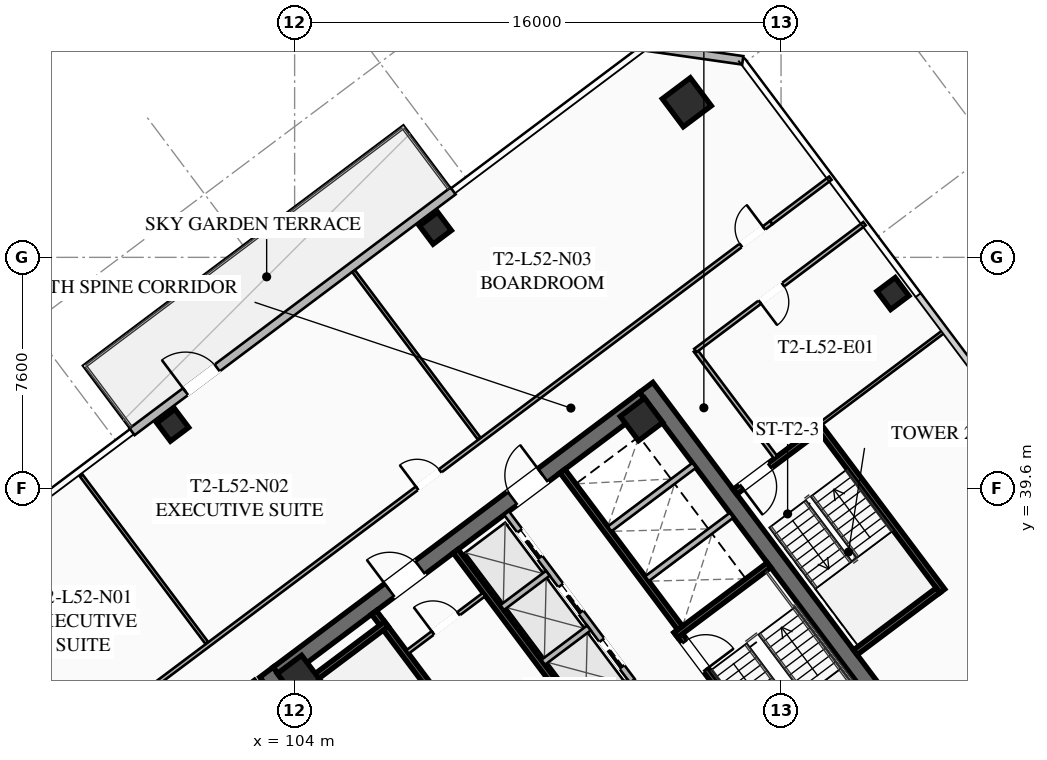
"""IFC4 building model, lengths in metres.
Left out: names, types, materials, properties, quantities, classifications, styles, units other than length and angle.
Written with IfcOpenShell. Run it as: python <this file> out.ifc"""

import sys

from ifc_helpers import new_model, si_unit, direction, frame, frame_2d, origin, origin_2d, place, context, subcontext, project, spatial, rectangle, hollow_rectangle, extrude, element, fill, save


model = new_model("IFC4")
c1 = context("Model", 3, precision=1e-05, world=origin(), true_north=direction((0.0, 1.0)))
c2 = subcontext(c1, "Body", "Model", "MODEL_VIEW")
j1 = project(units=[si_unit("LENGTHUNIT", "METRE"), si_unit("PLANEANGLEUNIT", "RADIAN")], contexts=[c1])
p1 = place(None, origin())
s1 = spatial("IfcSite", under=j1, at=p1, CompositionType="ELEMENT")
p2 = place(p1, origin())
s2 = spatial("IfcBuilding", under=s1, at=p2, CompositionType="ELEMENT")
p3 = place(p2, frame((0.0, 0.0, 192.5)))
s3 = spatial("IfcBuildingStorey", under=s2, at=p3, CompositionType="ELEMENT", Elevation=192.5)
for number, where, z_axis, x_axis in (
    (1, (112.436, 21.077, 0.0), (0.0, 0.0, 1.0), (-0.6, 0.8, 0.0)),
    (2, (115.564, 42.923, 0.0), (0.0, 0.0, 1.0), (0.6, -0.8, 0.0)),
):
    element("IfcWall", number, at=place(p3, frame(where, z_axis=z_axis, x_axis=x_axis)), inside=s3, PredefinedType="SHEAR", context=c2, shape_type="SweptSolid", body=[
        extrude(rectangle(XDim=15.6, YDim=0.55, at=frame_2d((7.8, 0.0))), origin(), (0.0, 0.0, 1.0), 3.55),
    ])
p4 = place(p3, frame((103.461, 33.502, 0.0), z_axis=(0.0, 0.0, 1.0), x_axis=(0.799998054672, 0.600002593761, 0.0)))
e3 = element("IfcWall", 3, at=p4, inside=s3, PredefinedType="SHEAR", context=c2, shape_type="SweptSolid", body=[
    extrude(rectangle(XDim=15.06, YDim=0.55, at=frame_2d((7.53, 0.0))), origin(), (0.0, 0.0, 1.0), 3.55),
])
p5 = place(p4, frame((4.58, 0.0, 0.0)))
e4 = element("IfcOpeningElement", 4, at=p5, cuts=e3, PredefinedType="OPENING", context=c2, shape_type="SweptSolid", body=[
    extrude(rectangle(XDim=1.25, YDim=2.25, at=frame_2d((0.625, 1.125))), frame((0.0, 0.285, 0.0), z_axis=(0.0, -1.0, 0.0), x_axis=(1.0, 0.0, 0.0)), (0.0, 0.0, 1.0), 0.57),
])
p6 = place(p4, frame((9.63, 0.0, 0.0)))
e5 = element("IfcOpeningElement", 5, at=p6, cuts=e3, PredefinedType="OPENING", context=c2, shape_type="SweptSolid", body=[
    extrude(rectangle(XDim=1.25, YDim=2.25, at=frame_2d((0.625, 1.125))), frame((0.0, 0.285, 0.0), z_axis=(0.0, -1.0, 0.0), x_axis=(1.0, 0.0, 0.0)), (0.0, 0.0, 1.0), 0.57),
])
for number, where, z_axis, x_axis in (
    (6, (115.41, 41.87, 0.0), (0.0, 0.0, 1.0), (0.8, 0.6, 0.0)),
    (7, (104.13, 33.41, 0.0), (0.0, 0.0, 1.0), (0.8, 0.6, 0.0)),
):
    element("IfcColumn", number, at=place(p3, frame(where, z_axis=z_axis, x_axis=x_axis)), inside=s3, PredefinedType="COLUMN", context=c2, shape_type="SweptSolid", body=[
        extrude(hollow_rectangle(XDim=1.0, YDim=1.0, WallThickness=0.04, at=origin_2d()), origin(), (0.0, 0.0, 1.0), 3.37),
    ])
p7 = place(p3, frame((116.9, 52.3, 0.0), z_axis=(0.0, 0.0, 1.0), x_axis=(0.799999996291, 0.600000004945, 0.0)))
e8 = element("IfcColumn", 8, at=p7, inside=s3, PredefinedType="COLUMN", context=c2, shape_type="SweptSolid", body=[
    extrude(hollow_rectangle(XDim=1.15, YDim=1.15, WallThickness=0.045, at=origin_2d()), origin(), (0.0, 0.0, 1.0), 3.37),
])
for number, where, z_axis, x_axis in (
    (9, (123.68, 46.01, 0.0), (0.0, 0.0, 1.0), (0.8, 0.6, 0.0)),
    (10, (108.63, 48.16, 0.0), (0.0, 0.0, 1.0), (0.8, 0.6, 0.0)),
    (11, (99.99, 41.68, 0.0), (0.0, 0.0, 1.0), (0.8, 0.6, 0.0)),
):
    element("IfcColumn", number, at=place(p3, frame(where, z_axis=z_axis, x_axis=x_axis)), inside=s3, PredefinedType="COLUMN", context=c2, shape_type="SweptSolid", body=[
        extrude(hollow_rectangle(XDim=0.75, YDim=0.75, WallThickness=0.032, at=origin_2d()), origin(), (0.0, 0.0, 1.0), 3.37),
    ])
p8 = place(p3, frame((98.652, 41.464, 0.0), z_axis=(0.0, 0.0, 1.0), x_axis=(0.799997780501, 0.60000295932, 0.0)))
e12 = element("IfcWall", 12, at=p8, inside=s3, PredefinedType="SOLIDWALL", context=c2, shape_type="SweptSolid", body=[
    extrude(rectangle(XDim=13.2, YDim=0.28, at=frame_2d((6.6, 0.0))), origin(), (0.0, 0.0, 1.0), 3.37),
])
p9 = place(p8, frame((2.2, 0.0, 0.0)))
e13 = element("IfcOpeningElement", 13, at=p9, cuts=e12, PredefinedType="OPENING", context=c2, shape_type="SweptSolid", body=[
    extrude(rectangle(XDim=1.3, YDim=2.15, at=frame_2d((0.65, 1.075))), frame((0.0, 0.15, 0.0), z_axis=(0.0, -1.0, 0.0), x_axis=(1.0, 0.0, 0.0)), (0.0, 0.0, 1.0), 0.3),
])
p10 = place(p3, frame((115.52, 54.14, 0.0), z_axis=(0.0, 0.0, 1.0), x_axis=(0.989950994782, -0.141410847992, 0.0)))
e14 = element("IfcWall", 14, at=p10, inside=s3, PredefinedType="SOLIDWALL", context=c2, shape_type="SweptSolid", body=[
    extrude(rectangle(XDim=3.253, YDim=0.28, at=frame_2d((1.626, 0.0))), origin(), (0.0, 0.0, 1.0), 3.37),
])
p11 = place(p3, frame((111.44, 29.08, 0.0), z_axis=(0.0, 0.0, 1.0), x_axis=(-0.59999029481, 0.8000072788, 0.0)))
e15 = element("IfcWall", 15, at=p11, inside=s3, PredefinedType="SHEAR", context=c2, shape_type="SweptSolid", body=[
    extrude(rectangle(XDim=8.05, YDim=0.2, at=frame_2d((4.025, 0.0))), origin(), (0.0, 0.0, 1.0), 3.37),
])
p12 = place(p11, frame((0.45, 0.0, 0.0)))
e16 = element("IfcOpeningElement", 16, at=p12, cuts=e15, PredefinedType="OPENING", context=c2, shape_type="SweptSolid", body=[
    extrude(rectangle(XDim=1.15, YDim=2.2, at=frame_2d((0.575, 1.1))), frame((0.0, 0.11, 0.0), z_axis=(0.0, -1.0, 0.0), x_axis=(1.0, 0.0, 0.0)), (0.0, 0.0, 1.0), 0.22),
])
p13 = place(p3, frame((103.956, 32.842, 0.0), z_axis=(0.0, 0.0, 1.0), x_axis=(0.800015298837, 0.599979601008, 0.0)))
e17 = element("IfcWall", 17, at=p13, inside=s3, PredefinedType="SHEAR", context=c2, shape_type="SweptSolid", body=[
    extrude(rectangle(XDim=3.83, YDim=0.2, at=frame_2d((1.915, 0.0))), origin(), (0.0, 0.0, 1.0), 3.37),
])
p14 = place(p3, frame((116.56, 34.92, 0.0), z_axis=(0.0, 0.0, 1.0), x_axis=(0.59999029481, -0.8000072788, 0.0)))
e18 = element("IfcWall", 18, at=p14, inside=s3, PredefinedType="SHEAR", context=c2, shape_type="SweptSolid", body=[
    extrude(rectangle(XDim=8.05, YDim=0.2, at=frame_2d((4.025, 0.0))), origin(), (0.0, 0.0, 1.0), 3.37),
])
p15 = place(p14, frame((0.45, 0.0, 0.0)))
e19 = element("IfcOpeningElement", 19, at=p15, cuts=e18, PredefinedType="OPENING", context=c2, shape_type="SweptSolid", body=[
    extrude(rectangle(XDim=1.15, YDim=2.2, at=frame_2d((0.575, 1.1))), frame((0.0, 0.11, 0.0), z_axis=(0.0, -1.0, 0.0), x_axis=(1.0, 0.0, 0.0)), (0.0, 0.0, 1.0), 0.22),
])
p16 = place(p3, frame((116.54, 34.78, 0.0), z_axis=(0.0, 0.0, 1.0), x_axis=(0.800015298837, 0.599979601008, 0.0)))
e20 = element("IfcWall", 20, at=p16, inside=s3, PredefinedType="SHEAR", context=c2, shape_type="SweptSolid", body=[
    extrude(rectangle(XDim=3.83, YDim=0.2, at=frame_2d((1.915, 0.0))), origin(), (0.0, 0.0, 1.0), 3.37),
])
p17 = place(p3, frame((117.998, 25.936, 0.0), z_axis=(0.0, 0.0, 1.0), x_axis=(-0.600002693989, 0.799997979501, 0.0)))
e21 = element("IfcWall", 21, at=p17, inside=s3, PredefinedType="SHEAR", context=c2, shape_type="SweptSolid", body=[
    extrude(rectangle(XDim=14.5, YDim=0.2, at=frame_2d((7.25, 0.0))), origin(), (0.0, 0.0, 1.0), 3.37),
])
p18 = place(p3, frame((112.81, 40.17, 0.0), z_axis=(0.0, 0.0, 1.0), x_axis=(0.599993943644, -0.800004542231, 0.0)))
e22 = element("IfcWall", 22, at=p18, inside=s3, PredefinedType="SHEAR", context=c2, shape_type="SweptSolid", body=[
    extrude(rectangle(XDim=6.45, YDim=0.2, at=frame_2d((3.225, 0.0))), origin(), (0.0, 0.0, 1.0), 3.37),
])
for number, where, z_axis, x_axis in (
    (23, (115.59, 36.63, 0.0), (0.0, 0.0, 1.0), (0.8, 0.6, 0.0)),
    (24, (114.36, 38.27, 0.0), (0.0, 0.0, 1.0), (0.8, 0.6, 0.0)),
):
    element("IfcWall", number, at=place(p3, frame(where, z_axis=z_axis, x_axis=x_axis)), inside=s3, PredefinedType="SOLIDWALL", context=c2, shape_type="SweptSolid", body=[
        extrude(rectangle(XDim=3.48, YDim=0.2, at=frame_2d((1.74, 0.0))), origin(), (0.0, 0.0, 1.0), 3.37),
    ])
p19 = place(p3, frame((107.71, 34.22, 0.0), z_axis=(0.0, 0.0, 1.0), x_axis=(0.799981399002, 0.60002480053, 0.0)))
e25 = element("IfcWall", 25, at=p19, inside=s3, PredefinedType="PARTITIONING", context=c2, shape_type="SweptSolid", body=[
    extrude(rectangle(XDim=3.15, YDim=0.135, at=frame_2d((1.575, 0.0))), origin(), (0.0, 0.0, 1.0), 2.723),
])
p20 = place(p19, frame((1.05, 0.0, 0.0)))
e26 = element("IfcOpeningElement", 26, at=p20, cuts=e25, PredefinedType="OPENING", context=c2, shape_type="SweptSolid", body=[
    extrude(rectangle(XDim=1.05, YDim=2.2, at=frame_2d((0.525, 1.1))), frame((0.0, 0.077, 0.0), z_axis=(0.0, -1.0, 0.0), x_axis=(1.0, 0.0, 0.0)), (0.0, 0.0, 1.0), 0.155),
])
p21 = place(p3, frame((115.11, 33.27, 0.0), z_axis=(0.0, 0.0, 1.0), x_axis=(-0.600011322243, 0.799991508192, 0.0)))
e27 = element("IfcWall", 27, at=p21, inside=s3, PredefinedType="SOLIDWALL", context=c2, shape_type="SweptSolid", body=[
    extrude(rectangle(XDim=6.9, YDim=0.2, at=frame_2d((3.45, 0.0))), origin(), (0.0, 0.0, 1.0), 3.37),
])
p22 = place(p21, frame((0.575, 0.0, 0.0)))
e28 = element("IfcOpeningElement", 28, at=p22, cuts=e27, PredefinedType="OPENING", context=c2, shape_type="SweptSolid", body=[
    extrude(rectangle(XDim=1.1, YDim=2.2, at=frame_2d((0.55, 1.1))), frame((0.0, 0.11, 0.0), z_axis=(0.0, -1.0, 0.0), x_axis=(1.0, 0.0, 0.0)), (0.0, 0.0, 1.0), 0.22),
])
p23 = place(p21, frame((2.825, 0.0, 0.0)))
e29 = element("IfcOpeningElement", 29, at=p23, cuts=e27, PredefinedType="OPENING", context=c2, shape_type="SweptSolid", body=[
    extrude(rectangle(XDim=1.1, YDim=2.2, at=frame_2d((0.55, 1.1))), frame((0.0, 0.11, 0.0), z_axis=(0.0, -1.0, 0.0), x_axis=(1.0, 0.0, 0.0)), (0.0, 0.0, 1.0), 0.22),
])
p24 = place(p21, frame((5.075, 0.0, 0.0)))
e30 = element("IfcOpeningElement", 30, at=p24, cuts=e27, PredefinedType="OPENING", context=c2, shape_type="SweptSolid", body=[
    extrude(rectangle(XDim=1.1, YDim=2.2, at=frame_2d((0.55, 1.1))), frame((0.0, 0.11, 0.0), z_axis=(0.0, -1.0, 0.0), x_axis=(1.0, 0.0, 0.0)), (0.0, 0.0, 1.0), 0.22),
])
p25 = place(p3, frame((112.176, 33.882, 0.0), z_axis=(0.0, 0.0, 1.0), x_axis=(0.8, 0.6, 0.0)))
e31 = element("IfcWall", 31, at=p25, inside=s3, PredefinedType="SOLIDWALL", context=c2, shape_type="SweptSolid", body=[
    extrude(rectangle(XDim=1.88, YDim=0.2, at=frame_2d((0.94, 0.0))), origin(), (0.0, 0.0, 1.0), 3.37),
])
p26 = place(p3, frame((110.826, 35.682, 0.0), z_axis=(0.0, 0.0, 1.0), x_axis=(0.799984418148, 0.600020775241, 0.0)))
e32 = element("IfcWall", 32, at=p26, inside=s3, PredefinedType="SOLIDWALL", context=c2, shape_type="SweptSolid", body=[
    extrude(rectangle(XDim=1.88, YDim=0.2, at=frame_2d((0.94, 0.0))), origin(), (0.0, 0.0, 1.0), 3.37),
])
p27 = place(p3, frame((125.304, 36.228, 0.0), z_axis=(0.0, 0.0, 1.0), x_axis=(-0.59998851072, 0.800008616831, 0.0)))
e33 = element("IfcWall", 33, at=p27, inside=s3, PredefinedType="SHEAR", context=c2, shape_type="SweptSolid", body=[
    extrude(rectangle(XDim=6.8, YDim=0.2, at=frame_2d((3.4, 0.0))), origin(), (0.0, 0.0, 1.0), 3.37),
])
p28 = place(p3, frame((121.204, 41.528, 0.0), z_axis=(0.0, 0.0, 1.0), x_axis=(-0.800017232136, -0.599977023131, 0.0)))
e34 = element("IfcWall", 34, at=p28, inside=s3, PredefinedType="SHEAR", context=c2, shape_type="SweptSolid", body=[
    extrude(rectangle(XDim=3.4, YDim=0.2, at=frame_2d((1.7, 0.0))), origin(), (0.0, 0.0, 1.0), 3.37),
])
p29 = place(p28, frame((1.975, 0.0, 0.0)))
e35 = element("IfcOpeningElement", 35, at=p29, cuts=e34, PredefinedType="OPENING", context=c2, shape_type="SweptSolid", body=[
    extrude(rectangle(XDim=1.15, YDim=2.2, at=frame_2d((0.575, 1.1))), frame((0.0, 0.11, 0.0), z_axis=(0.0, -1.0, 0.0), x_axis=(1.0, 0.0, 0.0)), (0.0, 0.0, 1.0), 0.22),
])
p30 = place(p3, frame((122.444, 34.208, 0.0), z_axis=(0.0, 0.0, 1.0), x_axis=(0.79999138319, 0.600011488909, 0.0)))
e36 = element("IfcWall", 36, at=p30, inside=s3, PredefinedType="SHEAR", context=c2, shape_type="SweptSolid", body=[
    extrude(rectangle(XDim=3.4, YDim=0.2, at=frame_2d((1.7, 0.0))), origin(), (0.0, 0.0, 1.0), 3.37),
])
p31 = place(p3, frame((119.824, 40.618, 0.0), z_axis=(0.0, 0.0, 1.0), x_axis=(-0.599982243973, 0.800013316712, 0.0)))
e37 = element("IfcWall", 37, at=p31, inside=s3, PredefinedType="PARTITIONING", context=c2, shape_type="SweptSolid", body=[
    extrude(rectangle(XDim=4.4, YDim=0.135, at=frame_2d((2.2, 0.0))), origin(), (0.0, 0.0, 1.0), 2.723),
])
p32 = place(p3, frame((96.718, 31.126, 0.0), z_axis=(0.0, 0.0, 1.0), x_axis=(0.8, 0.6, 0.0)))
e38 = element("IfcWall", 38, at=p32, inside=s3, PredefinedType="PARTITIONING", context=c2, shape_type="SweptSolid", body=[
    extrude(rectangle(XDim=28.7, YDim=0.135, at=frame_2d((14.35, 0.0))), origin(), (0.0, 0.0, 1.0), 2.723),
])
p33 = place(p32, frame((0.3, 0.0, 0.0)))
e39 = element("IfcOpeningElement", 39, at=p33, cuts=e38, PredefinedType="OPENING", context=c2, shape_type="SweptSolid", body=[
    extrude(rectangle(XDim=0.95, YDim=2.05, at=frame_2d((0.475, 1.025))), frame((0.0, 0.077, 0.0), z_axis=(0.0, -1.0, 0.0), x_axis=(1.0, 0.0, 0.0)), (0.0, 0.0, 1.0), 0.155),
])
p34 = place(p32, frame((14.138, 0.0, 0.0)))
e40 = element("IfcOpeningElement", 40, at=p34, cuts=e38, PredefinedType="OPENING", context=c2, shape_type="SweptSolid", body=[
    extrude(rectangle(XDim=0.95, YDim=2.05, at=frame_2d((0.475, 1.025))), frame((0.0, 0.077, 0.0), z_axis=(0.0, -1.0, 0.0), x_axis=(1.0, 0.0, 0.0)), (0.0, 0.0, 1.0), 0.155),
])
p35 = place(p32, frame((27.45, 0.0, 0.0)))
e41 = element("IfcOpeningElement", 41, at=p35, cuts=e38, PredefinedType="OPENING", context=c2, shape_type="SweptSolid", body=[
    extrude(rectangle(XDim=0.95, YDim=2.05, at=frame_2d((0.475, 1.025))), frame((0.0, 0.077, 0.0), z_axis=(0.0, -1.0, 0.0), x_axis=(1.0, 0.0, 0.0)), (0.0, 0.0, 1.0), 0.155),
])
p36 = place(p3, frame((119.678, 48.346, 0.0), z_axis=(0.0, 0.0, 1.0), x_axis=(0.800012055778, 0.599983925293, 0.0)))
e42 = element("IfcWall", 42, at=p36, inside=s3, PredefinedType="PARTITIONING", context=c2, shape_type="SweptSolid", body=[
    extrude(rectangle(XDim=2.43, YDim=0.135, at=frame_2d((1.215, 0.0))), origin(), (0.0, 0.0, 1.0), 2.723),
])
for number, where, z_axis, x_axis in (
    (43, (101.11, 34.52, 0.0), (0.0, 0.0, 1.0), (-0.6, 0.8, 0.0)),
    (44, (110.07, 41.24, 0.0), (0.0, 0.0, 1.0), (-0.6, 0.8, 0.0)),
):
    element("IfcWall", number, at=place(p3, frame(where, z_axis=z_axis, x_axis=x_axis)), inside=s3, PredefinedType="PARTITIONING", context=c2, shape_type="SweptSolid", body=[
        extrude(rectangle(XDim=6.88, YDim=0.11, at=frame_2d((3.44, 0.0))), origin(), (0.0, 0.0, 1.0), 2.723),
    ])
p37 = place(p3, frame((122.744, 48.308, 0.0), z_axis=(0.0, 0.0, 1.0), x_axis=(-0.79997892247, -0.600028102345, 0.0)))
e45 = element("IfcWall", 45, at=p37, inside=s3, PredefinedType="PARTITIONING", context=c2, shape_type="SweptSolid", body=[
    extrude(rectangle(XDim=6.95, YDim=0.135, at=frame_2d((3.475, 0.0))), origin(), (0.0, 0.0, 1.0), 2.723),
])
p38 = place(p37, frame((3.35, 0.0, 0.0)))
e46 = element("IfcOpeningElement", 46, at=p38, cuts=e45, PredefinedType="OPENING", context=c2, shape_type="SweptSolid", body=[
    extrude(rectangle(XDim=0.95, YDim=2.05, at=frame_2d((0.475, 1.025))), frame((0.0, 0.077, 0.0), z_axis=(0.0, -1.0, 0.0), x_axis=(1.0, 0.0, 0.0)), (0.0, 0.0, 1.0), 0.155),
])
p39 = place(p3, frame((125.208, 30.656, 0.0), z_axis=(0.0, 0.0, 1.0), x_axis=(0.800006797429, 0.599990936654, 0.0)))
e47 = element("IfcWall", 47, at=p39, inside=s3, PredefinedType="PARTITIONING", context=c2, shape_type="SweptSolid", body=[
    extrude(rectangle(XDim=8.62, YDim=0.135, at=frame_2d((4.31, 0.0))), origin(), (0.0, 0.0, 1.0), 2.723),
])
p40 = place(p39, frame((2.045, 0.0, 0.0)))
e48 = element("IfcOpeningElement", 48, at=p40, cuts=e47, PredefinedType="OPENING", context=c2, shape_type="SweptSolid", body=[
    extrude(rectangle(XDim=0.95, YDim=2.05, at=frame_2d((0.475, 1.025))), frame((0.0, 0.077, 0.0), z_axis=(0.0, -1.0, 0.0), x_axis=(1.0, 0.0, 0.0)), (0.0, 0.0, 1.0), 0.155),
])
p41 = place(p3, frame((125.384, 44.788, 0.0), z_axis=(0.0, 0.0, 1.0), x_axis=(-0.8, -0.6, 0.0)))
e49 = element("IfcWall", 49, at=p41, inside=s3, PredefinedType="PARTITIONING", context=c2, shape_type="SweptSolid", body=[
    extrude(rectangle(XDim=5.1, YDim=0.11, at=frame_2d((2.55, 0.0))), origin(), (0.0, 0.0, 1.0), 2.723),
])
p42 = place(p3, frame((112.104, 20.928, 0.0), z_axis=(0.0, 0.0, 1.0), x_axis=(-0.599994940075, 0.800003794918, 0.0)))
e50 = element("IfcWall", 50, at=p42, inside=s3, PredefinedType="PARTITIONING", context=c2, shape_type="SweptSolid", body=[
    extrude(rectangle(XDim=15.44, YDim=0.135, at=frame_2d((7.72, 0.0))), origin(), (0.0, 0.0, 1.0), 2.723),
])
p43 = place(p3, frame((102.728, 33.296, 0.0), z_axis=(0.0, 0.0, 1.0), x_axis=(-0.800013722153, -0.59998170336, 0.0)))
e51 = element("IfcWall", 51, at=p43, inside=s3, PredefinedType="PARTITIONING", context=c2, shape_type="SweptSolid", body=[
    extrude(rectangle(XDim=8.54, YDim=0.135, at=frame_2d((4.27, 0.0))), origin(), (0.0, 0.0, 1.0), 2.723),
])
p44 = place(p43, frame((0.5, 0.0, 0.0)))
e52 = element("IfcOpeningElement", 52, at=p44, cuts=e51, PredefinedType="OPENING", context=c2, shape_type="SweptSolid", body=[
    extrude(rectangle(XDim=0.95, YDim=2.05, at=frame_2d((0.475, 1.025))), frame((0.0, 0.077, 0.0), z_axis=(0.0, -1.0, 0.0), x_axis=(1.0, 0.0, 0.0)), (0.0, 0.0, 1.0), 0.155),
])
p45 = place(p9, origin())
e53 = element("IfcDoor", 53, at=p45, inside=s3, OperationType="SINGLE_SWING_LEFT", PredefinedType="DOOR", context=c2, shape_type="SweptSolid", body=[
    extrude(rectangle(XDim=1.3, YDim=2.15, at=frame_2d((0.65, 1.075))), frame((0.0, 0.025, 0.0), z_axis=(0.0, -1.0, 0.0), x_axis=(1.0, 0.0, 0.0)), (0.0, 0.0, 1.0), 0.05),
])
fill(e13, e53)
p46 = place(p5, origin())
e54 = element("IfcDoor", 54, at=p46, inside=s3, OperationType="SINGLE_SWING_LEFT", PredefinedType="DOOR", context=c2, shape_type="SweptSolid", body=[
    extrude(rectangle(XDim=1.25, YDim=2.25, at=frame_2d((0.625, 1.125))), frame((0.0, 0.025, 0.0), z_axis=(0.0, -1.0, 0.0), x_axis=(1.0, 0.0, 0.0)), (0.0, 0.0, 1.0), 0.05),
])
fill(e4, e54)
p47 = place(p6, origin())
e55 = element("IfcDoor", 55, at=p47, inside=s3, OperationType="SINGLE_SWING_RIGHT", PredefinedType="DOOR", context=c2, shape_type="SweptSolid", body=[
    extrude(rectangle(XDim=1.25, YDim=2.25, at=frame_2d((0.625, 1.125))), frame((0.0, 0.025, 0.0), z_axis=(0.0, -1.0, 0.0), x_axis=(1.0, 0.0, 0.0)), (0.0, 0.0, 1.0), 0.05),
])
fill(e5, e55)
p48 = place(p15, origin())
e56 = element("IfcDoor", 56, at=p48, inside=s3, OperationType="SINGLE_SWING_RIGHT", PredefinedType="DOOR", context=c2, shape_type="SweptSolid", body=[
    extrude(rectangle(XDim=1.15, YDim=2.2, at=frame_2d((0.575, 1.1))), frame((0.0, 0.025, 0.0), z_axis=(0.0, -1.0, 0.0), x_axis=(1.0, 0.0, 0.0)), (0.0, 0.0, 1.0), 0.05),
])
fill(e19, e56)
p49 = place(p20, origin())
e57 = element("IfcDoor", 57, at=p49, inside=s3, OperationType="SINGLE_SWING_LEFT", PredefinedType="DOOR", context=c2, shape_type="SweptSolid", body=[
    extrude(rectangle(XDim=1.05, YDim=2.2, at=frame_2d((0.525, 1.1))), frame((0.0, 0.025, 0.0), z_axis=(0.0, -1.0, 0.0), x_axis=(1.0, 0.0, 0.0)), (0.0, 0.0, 1.0), 0.05),
])
fill(e26, e57)
p50 = place(p29, origin())
e58 = element("IfcDoor", 58, at=p50, inside=s3, OperationType="SINGLE_SWING_RIGHT", PredefinedType="DOOR", context=c2, shape_type="SweptSolid", body=[
    extrude(rectangle(XDim=1.15, YDim=2.2, at=frame_2d((0.575, 1.1))), frame((0.0, 0.025, 0.0), z_axis=(0.0, -1.0, 0.0), x_axis=(1.0, 0.0, 0.0)), (0.0, 0.0, 1.0), 0.05),
])
fill(e35, e58)
p51 = place(p34, origin())
e59 = element("IfcDoor", 59, at=p51, inside=s3, OperationType="SINGLE_SWING_LEFT", PredefinedType="DOOR", context=c2, shape_type="SweptSolid", body=[
    extrude(rectangle(XDim=0.95, YDim=2.05, at=frame_2d((0.475, 1.025))), frame((0.0, 0.025, 0.0), z_axis=(0.0, -1.0, 0.0), x_axis=(1.0, 0.0, 0.0)), (0.0, 0.0, 1.0), 0.05),
])
fill(e40, e59)
p52 = place(p35, origin())
e60 = element("IfcDoor", 60, at=p52, inside=s3, OperationType="SINGLE_SWING_RIGHT", PredefinedType="DOOR", context=c2, shape_type="SweptSolid", body=[
    extrude(rectangle(XDim=0.95, YDim=2.05, at=frame_2d((0.475, 1.025))), frame((0.0, 0.025, 0.0), z_axis=(0.0, -1.0, 0.0), x_axis=(1.0, 0.0, 0.0)), (0.0, 0.0, 1.0), 0.05),
])
fill(e41, e60)
p53 = place(p38, origin())
e61 = element("IfcDoor", 61, at=p53, inside=s3, OperationType="SINGLE_SWING_RIGHT", PredefinedType="DOOR", context=c2, shape_type="SweptSolid", body=[
    extrude(rectangle(XDim=0.95, YDim=2.05, at=frame_2d((0.475, 1.025))), frame((0.0, 0.025, 0.0), z_axis=(0.0, -1.0, 0.0), x_axis=(1.0, 0.0, 0.0)), (0.0, 0.0, 1.0), 0.05),
])
fill(e46, e61)
p54 = place(p22, origin())
e62 = element("IfcDoor", 62, at=p54, inside=s3, OperationType="SLIDING_TO_LEFT", PredefinedType="DOOR", context=c2, shape_type="SweptSolid", body=[
    extrude(rectangle(XDim=1.1, YDim=2.2, at=frame_2d((0.55, 1.1))), frame((0.0, 0.025, 0.0), z_axis=(0.0, -1.0, 0.0), x_axis=(1.0, 0.0, 0.0)), (0.0, 0.0, 1.0), 0.05),
])
fill(e28, e62)
p55 = place(p23, origin())
e63 = element("IfcDoor", 63, at=p55, inside=s3, OperationType="SLIDING_TO_LEFT", PredefinedType="DOOR", context=c2, shape_type="SweptSolid", body=[
    extrude(rectangle(XDim=1.1, YDim=2.2, at=frame_2d((0.55, 1.1))), frame((0.0, 0.025, 0.0), z_axis=(0.0, -1.0, 0.0), x_axis=(1.0, 0.0, 0.0)), (0.0, 0.0, 1.0), 0.05),
])
fill(e29, e63)
p56 = place(p24, origin())
e64 = element("IfcDoor", 64, at=p56, inside=s3, OperationType="SLIDING_TO_LEFT", PredefinedType="DOOR", context=c2, shape_type="SweptSolid", body=[
    extrude(rectangle(XDim=1.1, YDim=2.2, at=frame_2d((0.55, 1.1))), frame((0.0, 0.025, 0.0), z_axis=(0.0, -1.0, 0.0), x_axis=(1.0, 0.0, 0.0)), (0.0, 0.0, 1.0), 0.05),
])
fill(e30, e64)
save(model, sys.argv[1])
